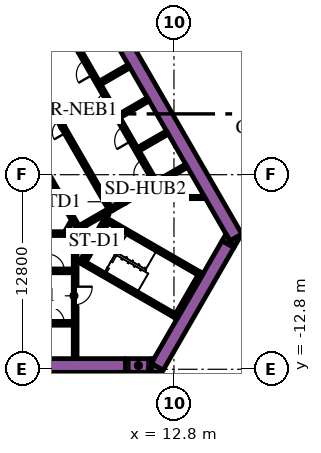
"""IFC4 building model, lengths in metres.
Left out: names, types, materials, properties, quantities, classifications, styles, units other than length and angle.
Written with IfcOpenShell. Run it as: python <this file> out.ifc"""

import sys

from ifc_helpers import new_model, si_unit, direction, frame, frame_2d, origin, place, context, subcontext, project, spatial, polyline, rectangle, outline, extrude, element, fill, save


model = new_model("IFC4")
c1 = context("Model", 3, precision=1e-05, world=origin(), true_north=direction((0.0, 1.0)))
c2 = subcontext(c1, "Body", "Model", "MODEL_VIEW")
j1 = project(units=[si_unit("LENGTHUNIT", "METRE"), si_unit("PLANEANGLEUNIT", "RADIAN")], contexts=[c1])
p1 = place(None, origin())
s1 = spatial("IfcSite", under=j1, at=p1, CompositionType="ELEMENT")
p2 = place(p1, origin())
s2 = spatial("IfcBuilding", under=s1, at=p2, CompositionType="ELEMENT")
p3 = place(p2, frame((0.0, 0.0, 21.6)))
s3 = spatial("IfcBuildingStorey", under=s2, at=p3, CompositionType="ELEMENT", Elevation=21.6)
p4 = place(p3, frame((6.776, 13.364, 0.0), z_axis=(0.0, 0.0, 1.0), x_axis=(0.500004177138, -0.8660229921, 0.0)))
e1 = element("IfcWall", 1, at=p4, inside=s3, PredefinedType="SOLIDWALL", context=c2, shape_type="SweptSolid", body=[
    extrude(rectangle(XDim=20.204, YDim=0.9, at=frame_2d((10.102, 0.0))), origin(), (0.0, 0.0, 1.0), 6.0),
])
p5 = place(p3, origin())
e2 = element("IfcWall", 2, at=p5, inside=s3, PredefinedType="SOLIDWALL", context=c2, shape_type="SweptSolid", body=[
    extrude(outline(polyline([(16.743, -4.8), (16.489, -4.36), (17.251, -3.92), (16.743, -4.8)])), origin(), (0.0, 0.0, 1.0), 6.0),
])
p6 = place(p3, frame((11.695, -12.644, 0.0), z_axis=(0.0, 0.0, 1.0), x_axis=(0.500010229568, 0.86601949766, 0.0)))
e3 = element("IfcWall", 3, at=p6, inside=s3, PredefinedType="SOLIDWALL", context=c2, shape_type="SweptSolid", body=[
    extrude(rectangle(XDim=9.326, YDim=0.9, at=frame_2d((4.663, 0.0))), origin(), (0.0, 0.0, 1.0), 6.0),
])
e4 = element("IfcWall", 4, at=p5, inside=s3, PredefinedType="SOLIDWALL", context=c2, shape_type="SweptSolid", body=[
    extrude(outline(polyline([(12.009, -13.0), (11.312, -13.0), (11.312, -12.425), (12.083, -12.871), (12.009, -13.0)])), origin(), (0.0, 0.0, 1.0), 6.0),
])
e5 = element("IfcWall", 5, at=p5, inside=s3, PredefinedType="SOLIDWALL", context=c2, shape_type="SweptSolid", body=[
    extrude(outline(polyline([(16.223, -3.9), (16.732, -4.78), (15.969, -4.34), (16.223, -3.9)])), origin(), (0.0, 0.0, 1.0), 6.0),
])
e6 = element("IfcWall", 6, at=p5, inside=s3, PredefinedType="SOLIDWALL", context=c2, shape_type="SweptSolid", body=[
    extrude(outline(polyline([(11.489, -12.1), (11.312, -12.407), (11.312, -12.1), (11.489, -12.1)])), origin(), (0.0, 0.0, 1.0), 6.0),
])
p7 = place(p3, frame((-12.019, -12.55, 0.0), z_axis=(0.0, 0.0, 1.0), x_axis=(1.0, 0.0, 0.0)))
e7 = element("IfcWall", 7, at=p7, inside=s3, PredefinedType="SOLIDWALL", context=c2, shape_type="SweptSolid", body=[
    extrude(rectangle(XDim=21.63, YDim=0.9, at=frame_2d((10.815, 0.0))), origin(), (0.0, 0.0, 1.0), 6.0),
])
p8 = place(p3, frame((12.885, -9.431, 0.0), z_axis=(0.0, 0.0, 1.0), x_axis=(0.500020560727, 0.866013532718, 0.0)))
e8 = element("IfcWall", 8, at=p8, inside=s3, PredefinedType="SOLIDWALL", context=c2, shape_type="SweptSolid", body=[
    extrude(rectangle(XDim=3.45, YDim=0.25, at=frame_2d((1.725, 0.0))), origin(), (0.0, 0.0, 1.0), 6.0),
])
p9 = place(p3, frame((12.84, -9.261, 0.0), z_axis=(0.0, 0.0, 1.0), x_axis=(-0.866013990052, 0.500019768644, 0.0)))
e9 = element("IfcWall", 9, at=p9, inside=s3, PredefinedType="SOLIDWALL", context=c2, shape_type="SweptSolid", body=[
    extrude(rectangle(XDim=6.8, YDim=0.25, at=frame_2d((3.4, 0.0))), origin(), (0.0, 0.0, 1.0), 6.0),
])
p10 = place(p3, frame((6.78, -5.906, 0.0), z_axis=(0.0, 0.0, 1.0), x_axis=(0.500223362819, 0.865896406789, 0.0)))
e10 = element("IfcWall", 10, at=p10, inside=s3, PredefinedType="SOLIDWALL", context=c2, shape_type="SweptSolid", body=[
    extrude(rectangle(XDim=0.675, YDim=0.25, at=frame_2d((0.337, 0.0))), origin(), (0.0, 0.0, 1.0), 6.0),
])
p11 = place(p3, frame((8.334, -2.964, 0.0), z_axis=(0.0, 0.0, 1.0), x_axis=(0.866016039709, -0.500016218704, 0.0)))
e11 = element("IfcWall", 11, at=p11, inside=s3, PredefinedType="SOLIDWALL", context=c2, shape_type="SweptSolid", body=[
    extrude(rectangle(XDim=7.05, YDim=0.25, at=frame_2d((3.525, 0.0))), origin(), (0.0, 0.0, 1.0), 6.0),
])
p12 = place(p3, frame((8.168, -3.503, 0.0), z_axis=(0.0, 0.0, 1.0), x_axis=(0.49972245349, 0.866185586049, 0.0)))
e12 = element("IfcWall", 12, at=p12, inside=s3, PredefinedType="SOLIDWALL", context=c2, shape_type="SweptSolid", body=[
    extrude(rectangle(XDim=0.425, YDim=0.25, at=frame_2d((0.212, 0.0))), origin(), (0.0, 0.0, 1.0), 6.0),
])
p13 = place(p3, frame((-5.545, -3.875, 0.0), z_axis=(0.0, 0.0, 1.0), x_axis=(1.0, 0.0, 0.0)))
e13 = element("IfcWall", 13, at=p13, inside=s3, PredefinedType="SOLIDWALL", context=c2, shape_type="SweptSolid", body=[
    extrude(rectangle(XDim=11.97, YDim=0.25, at=frame_2d((5.985, 0.0))), origin(), (0.0, 0.0, 1.0), 6.0),
])
p14 = place(p3, frame((6.3, -8.67, 0.0), z_axis=(0.0, 0.0, 1.0), x_axis=(0.0, -1.0, 0.0)))
e14 = element("IfcWall", 14, at=p14, inside=s3, PredefinedType="SOLIDWALL", context=c2, shape_type="SweptSolid", body=[
    extrude(rectangle(XDim=3.43, YDim=0.25, at=frame_2d((1.715, 0.0))), origin(), (0.0, 0.0, 1.0), 6.0),
])
p15 = place(p3, frame((6.3, -7.268, 0.0), z_axis=(0.0, 0.0, 1.0), x_axis=(0.0, 1.0, 0.0)))
e15 = element("IfcWall", 15, at=p15, inside=s3, PredefinedType="SOLIDWALL", context=c2, shape_type="SweptSolid", body=[
    extrude(rectangle(XDim=3.268, YDim=0.25, at=frame_2d((1.634, 0.0))), origin(), (0.0, 0.0, 1.0), 6.0),
])
p16 = place(p3, frame((10.464, 1.677, 0.0), z_axis=(0.0, 0.0, 1.0), x_axis=(0.86605622881, 0.499946605688, 0.0)))
e16 = element("IfcWall", 16, at=p16, inside=s3, PredefinedType="SOLIDWALL", context=c2, shape_type="SweptSolid", body=[
    extrude(rectangle(XDim=2.2, YDim=0.25, at=frame_2d((1.1, 0.0))), origin(), (0.0, 0.0, 1.0), 6.0),
])
p17 = place(p3, frame((13.629, 0.594, 0.0), z_axis=(0.0, 0.0, 1.0), x_axis=(-0.866063384774, -0.499934209226, 0.0)))
e17 = element("IfcWall", 17, at=p17, inside=s3, PredefinedType="SOLIDWALL", context=c2, shape_type="SweptSolid", body=[
    extrude(rectangle(XDim=2.428, YDim=0.25, at=frame_2d((1.214, 0.0))), origin(), (0.0, 0.0, 1.0), 6.0),
])
e18 = element("IfcWall", 18, at=p5, inside=s3, PredefinedType="SOLIDWALL", context=c2, shape_type="SweptSolid", body=[
    extrude(outline(polyline([(0.566, 6.725), (0.566, 6.875), (0.566, 6.875), (0.565, 6.875), (0.361, 6.875), (0.035, 7.439), (0.252, 7.564), (0.377, 7.348), (6.552, -3.348), (6.677, -3.564), (6.46, -3.689), (0.448, 6.725), (0.565, 6.725), (0.566, 6.725), (0.566, 6.725)])), origin(), (0.0, 0.0, 1.0), 6.0),
])
p18 = place(p3, frame((6.614, -3.456, 0.0), z_axis=(0.0, 0.0, 1.0), x_axis=(0.866031582473, 0.499989298045, 0.0)))
e19 = element("IfcWall", 19, at=p18, inside=s3, PredefinedType="SOLIDWALL", context=c2, shape_type="SweptSolid", body=[
    extrude(rectangle(XDim=2.455, YDim=0.25, at=frame_2d((1.228, 0.0))), origin(), (0.0, 0.0, 1.0), 6.0),
])
for number, where, z_axis, x_axis in (
    (20, (7.944, 6.041, 0.0), (0.0, 0.0, 1.0), (0.866, 0.5, 0.0)),
    (21, (9.204, 3.859, 0.0), (0.0, 0.0, 1.0), (0.866, 0.5, 0.0)),
):
    element("IfcWall", number, at=place(p3, frame(where, z_axis=z_axis, x_axis=x_axis)), inside=s3, PredefinedType="SOLIDWALL", context=c2, shape_type="SweptSolid", body=[
        extrude(rectangle(XDim=2.2, YDim=0.25, at=frame_2d((1.1, 0.0))), origin(), (0.0, 0.0, 1.0), 6.0),
    ])
p19 = place(p3, frame((6.945, -5.222, 0.0), z_axis=(0.0, 0.0, 1.0), x_axis=(-0.499818422106, -0.866130212453, 0.0)))
e22 = element("IfcWall", 22, at=p19, inside=s3, PredefinedType="PARTITIONING", context=c2, shape_type="SweptSolid", body=[
    extrude(rectangle(XDim=0.514, YDim=0.15, at=frame_2d((0.257, 0.0))), origin(), (0.0, 0.0, 1.0), 4.85),
])
p20 = place(p3, frame((5.705, -3.718, 0.0), z_axis=(0.0, 0.0, 1.0), x_axis=(0.499962090823, 0.866047289552, 0.0)))
e23 = element("IfcWall", 23, at=p20, inside=s3, PredefinedType="PARTITIONING", context=c2, shape_type="SweptSolid", body=[
    extrude(rectangle(XDim=0.735, YDim=0.15, at=frame_2d((0.367, 0.0))), origin(), (0.0, 0.0, 1.0), 4.85),
])
p21 = place(p3, frame((8.459, -2.599, 0.0), z_axis=(0.0, 0.0, 1.0), x_axis=(-0.500041054325, -0.866001699761, 0.0)))
e24 = element("IfcWall", 24, at=p21, inside=s3, PredefinedType="PARTITIONING", context=c2, shape_type="SweptSolid", body=[
    extrude(rectangle(XDim=0.929, YDim=0.15, at=frame_2d((0.464, 0.0))), origin(), (0.0, 0.0, 1.0), 6.0),
])
p22 = place(p3, frame((10.362, -1.5, 0.0), z_axis=(0.0, 0.0, 1.0), x_axis=(1.0, 0.0, 0.0)))
e25 = element("IfcWall", 25, at=p22, inside=s3, PredefinedType="PARTITIONING", context=c2, shape_type="SweptSolid", body=[
    extrude(rectangle(XDim=4.439, YDim=0.15, at=frame_2d((2.22, 0.0))), origin(), (0.0, 0.0, 1.0), 4.85),
])
p23 = place(p3, frame((-4.2, -1.5, 0.0), z_axis=(0.0, 0.0, 1.0), x_axis=(1.0, 0.0, 0.0)))
e26 = element("IfcWall", 26, at=p23, inside=s3, PredefinedType="PARTITIONING", context=c2, shape_type="SweptSolid", body=[
    extrude(rectangle(XDim=9.359, YDim=0.15, at=frame_2d((4.68, 0.0))), origin(), (0.0, 0.0, 1.0), 4.85),
])
p24 = place(p3, frame((-6.175, -9.775, 0.0), z_axis=(0.0, 0.0, 1.0), x_axis=(1.0, 0.0, 0.0)))
e27 = element("IfcWall", 27, at=p24, inside=s3, PredefinedType="SOLIDWALL", context=c2, shape_type="SweptSolid", body=[
    extrude(rectangle(XDim=12.35, YDim=0.25, at=frame_2d((6.175, 0.0))), origin(), (0.0, 0.0, 1.0), 6.0),
])
p25 = place(p24, frame((0.585, 0.0, 0.0)))
e28 = element("IfcOpeningElement", 28, at=p25, cuts=e27, PredefinedType="OPENING", context=c2, shape_type="SweptSolid", body=[
    extrude(rectangle(XDim=1.1, YDim=2.1, at=frame_2d((0.55, 1.05))), frame((0.0, 0.135, 0.0), z_axis=(0.0, -1.0, 0.0), x_axis=(1.0, 0.0, 0.0)), (0.0, 0.0, 1.0), 0.27),
])
p26 = place(p24, frame((3.105, 0.0, 0.0)))
e29 = element("IfcOpeningElement", 29, at=p26, cuts=e27, PredefinedType="OPENING", context=c2, shape_type="SweptSolid", body=[
    extrude(rectangle(XDim=1.1, YDim=2.1, at=frame_2d((0.55, 1.05))), frame((0.0, 0.135, 0.0), z_axis=(0.0, -1.0, 0.0), x_axis=(1.0, 0.0, 0.0)), (0.0, 0.0, 1.0), 0.27),
])
p27 = place(p24, frame((5.625, 0.0, 0.0)))
e30 = element("IfcOpeningElement", 30, at=p27, cuts=e27, PredefinedType="OPENING", context=c2, shape_type="SweptSolid", body=[
    extrude(rectangle(XDim=1.1, YDim=2.1, at=frame_2d((0.55, 1.05))), frame((0.0, 0.135, 0.0), z_axis=(0.0, -1.0, 0.0), x_axis=(1.0, 0.0, 0.0)), (0.0, 0.0, 1.0), 0.27),
])
p28 = place(p24, frame((8.145, 0.0, 0.0)))
e31 = element("IfcOpeningElement", 31, at=p28, cuts=e27, PredefinedType="OPENING", context=c2, shape_type="SweptSolid", body=[
    extrude(rectangle(XDim=1.1, YDim=2.1, at=frame_2d((0.55, 1.05))), frame((0.0, 0.135, 0.0), z_axis=(0.0, -1.0, 0.0), x_axis=(1.0, 0.0, 0.0)), (0.0, 0.0, 1.0), 0.27),
])
p29 = place(p24, frame((10.665, 0.0, 0.0)))
e32 = element("IfcOpeningElement", 32, at=p29, cuts=e27, PredefinedType="OPENING", context=c2, shape_type="SweptSolid", body=[
    extrude(rectangle(XDim=1.1, YDim=2.1, at=frame_2d((0.55, 1.05))), frame((0.0, 0.135, 0.0), z_axis=(0.0, -1.0, 0.0), x_axis=(1.0, 0.0, 0.0)), (0.0, 0.0, 1.0), 0.27),
])
p30 = place(p3, frame((-6.175, -6.325, 0.0), z_axis=(0.0, 0.0, 1.0), x_axis=(1.0, 0.0, 0.0)))
e33 = element("IfcWall", 33, at=p30, inside=s3, PredefinedType="SOLIDWALL", context=c2, shape_type="SweptSolid", body=[
    extrude(rectangle(XDim=12.35, YDim=0.25, at=frame_2d((6.175, 0.0))), origin(), (0.0, 0.0, 1.0), 6.0),
])
p31 = place(p30, frame((3.205, 0.0, 0.0)))
e34 = element("IfcOpeningElement", 34, at=p31, cuts=e33, PredefinedType="OPENING", context=c2, shape_type="SweptSolid", body=[
    extrude(rectangle(XDim=0.9, YDim=2.1, at=frame_2d((0.45, 1.05))), frame((0.0, 0.135, 0.0), z_axis=(0.0, -1.0, 0.0), x_axis=(1.0, 0.0, 0.0)), (0.0, 0.0, 1.0), 0.27),
])
p32 = place(p30, frame((8.145, 0.0, 0.0)))
e35 = element("IfcOpeningElement", 35, at=p32, cuts=e33, PredefinedType="OPENING", context=c2, shape_type="SweptSolid", body=[
    extrude(rectangle(XDim=1.1, YDim=2.1, at=frame_2d((0.55, 1.05))), frame((0.0, 0.135, 0.0), z_axis=(0.0, -1.0, 0.0), x_axis=(1.0, 0.0, 0.0)), (0.0, 0.0, 1.0), 0.27),
])
p33 = place(p30, frame((10.665, 0.0, 0.0)))
e36 = element("IfcOpeningElement", 36, at=p33, cuts=e33, PredefinedType="OPENING", context=c2, shape_type="SweptSolid", body=[
    extrude(rectangle(XDim=1.1, YDim=2.1, at=frame_2d((0.55, 1.05))), frame((0.0, 0.135, 0.0), z_axis=(0.0, -1.0, 0.0), x_axis=(1.0, 0.0, 0.0)), (0.0, 0.0, 1.0), 0.27),
])
p34 = place(p3, frame((11.553, -0.46, 0.0), z_axis=(0.0, 0.0, 1.0), x_axis=(-0.500006514828, 0.866021642414, 0.0)))
e37 = element("IfcWall", 37, at=p34, inside=s3, PredefinedType="SOLIDWALL", context=c2, shape_type="SweptSolid", body=[
    extrude(rectangle(XDim=12.35, YDim=0.25, at=frame_2d((6.175, 0.0))), origin(), (0.0, 0.0, 1.0), 6.0),
])
p35 = place(p34, frame((0.585, 0.0, 0.0)))
e38 = element("IfcOpeningElement", 38, at=p35, cuts=e37, PredefinedType="OPENING", context=c2, shape_type="SweptSolid", body=[
    extrude(rectangle(XDim=1.1, YDim=2.1, at=frame_2d((0.55, 1.05))), frame((0.0, 0.135, 0.0), z_axis=(0.0, -1.0, 0.0), x_axis=(1.0, 0.0, 0.0)), (0.0, 0.0, 1.0), 0.27),
])
p36 = place(p34, frame((3.105, 0.0, 0.0)))
e39 = element("IfcOpeningElement", 39, at=p36, cuts=e37, PredefinedType="OPENING", context=c2, shape_type="SweptSolid", body=[
    extrude(rectangle(XDim=1.1, YDim=2.1, at=frame_2d((0.55, 1.05))), frame((0.0, 0.135, 0.0), z_axis=(0.0, -1.0, 0.0), x_axis=(1.0, 0.0, 0.0)), (0.0, 0.0, 1.0), 0.27),
])
p37 = place(p34, frame((5.625, 0.0, 0.0)))
e40 = element("IfcOpeningElement", 40, at=p37, cuts=e37, PredefinedType="OPENING", context=c2, shape_type="SweptSolid", body=[
    extrude(rectangle(XDim=1.1, YDim=2.1, at=frame_2d((0.55, 1.05))), frame((0.0, 0.135, 0.0), z_axis=(0.0, -1.0, 0.0), x_axis=(1.0, 0.0, 0.0)), (0.0, 0.0, 1.0), 0.27),
])
p38 = place(p34, frame((8.145, 0.0, 0.0)))
e41 = element("IfcOpeningElement", 41, at=p38, cuts=e37, PredefinedType="OPENING", context=c2, shape_type="SweptSolid", body=[
    extrude(rectangle(XDim=1.1, YDim=2.1, at=frame_2d((0.55, 1.05))), frame((0.0, 0.135, 0.0), z_axis=(0.0, -1.0, 0.0), x_axis=(1.0, 0.0, 0.0)), (0.0, 0.0, 1.0), 0.27),
])
p39 = place(p34, frame((10.665, 0.0, 0.0)))
e42 = element("IfcOpeningElement", 42, at=p39, cuts=e37, PredefinedType="OPENING", context=c2, shape_type="SweptSolid", body=[
    extrude(rectangle(XDim=1.1, YDim=2.1, at=frame_2d((0.55, 1.05))), frame((0.0, 0.135, 0.0), z_axis=(0.0, -1.0, 0.0), x_axis=(1.0, 0.0, 0.0)), (0.0, 0.0, 1.0), 0.27),
])
p40 = place(p3, frame((8.565, -2.185, 0.0), z_axis=(0.0, 0.0, 1.0), x_axis=(-0.499997954832, 0.866026584559, 0.0)))
e43 = element("IfcWall", 43, at=p40, inside=s3, PredefinedType="SOLIDWALL", context=c2, shape_type="SweptSolid", body=[
    extrude(rectangle(XDim=12.35, YDim=0.25, at=frame_2d((6.175, 0.0))), origin(), (0.0, 0.0, 1.0), 6.0),
])
p41 = place(p40, frame((5.725, 0.0, 0.0)))
e44 = element("IfcOpeningElement", 44, at=p41, cuts=e43, PredefinedType="OPENING", context=c2, shape_type="SweptSolid", body=[
    extrude(rectangle(XDim=0.9, YDim=2.1, at=frame_2d((0.45, 1.05))), frame((0.0, 0.135, 0.0), z_axis=(0.0, -1.0, 0.0), x_axis=(1.0, 0.0, 0.0)), (0.0, 0.0, 1.0), 0.27),
])
p42 = place(p3, frame((7.053, -5.284, 0.0), z_axis=(0.0, 0.0, 1.0), x_axis=(0.500078061341, 0.865980330357, 0.0)))
e45 = element("IfcWall", 45, at=p42, inside=s3, PredefinedType="SOLIDWALL", context=c2, shape_type="SweptSolid", body=[
    extrude(rectangle(XDim=2.1, YDim=0.4, at=frame_2d((1.05, 0.0))), origin(), (0.0, 0.0, 1.0), 6.0),
])
p43 = place(p42, frame((0.45, 0.0, 0.0)))
e46 = element("IfcOpeningElement", 46, at=p43, cuts=e45, PredefinedType="OPENING", context=c2, shape_type="SweptSolid", body=[
    extrude(rectangle(XDim=1.2, YDim=2.1, at=frame_2d((0.6, 1.05))), frame((0.0, 0.21, 0.0), z_axis=(0.0, -1.0, 0.0), x_axis=(1.0, 0.0, 0.0)), (0.0, 0.0, 1.0), 0.42),
])
p44 = place(p3, frame((8.74, -2.229, 0.0), z_axis=(0.0, 0.0, 1.0), x_axis=(0.865989075817, 0.500062916607, 0.0)))
e47 = element("IfcWall", 47, at=p44, inside=s3, PredefinedType="SOLIDWALL", context=c2, shape_type="SweptSolid", body=[
    extrude(rectangle(XDim=1.8, YDim=0.25, at=frame_2d((0.9, 0.0))), origin(), (0.0, 0.0, 1.0), 6.0),
])
p45 = place(p44, frame((0.45, 0.0, 0.0)))
e48 = element("IfcOpeningElement", 48, at=p45, cuts=e47, PredefinedType="OPENING", context=c2, shape_type="SweptSolid", body=[
    extrude(rectangle(XDim=0.9, YDim=2.1, at=frame_2d((0.45, 1.05))), frame((0.0, 0.135, 0.0), z_axis=(0.0, -1.0, 0.0), x_axis=(1.0, 0.0, 0.0)), (0.0, 0.0, 1.0), 0.27),
])
p46 = place(p3, frame((6.22, -7.266, 0.0), z_axis=(0.0, 0.0, 1.0), x_axis=(0.0, -1.0, 0.0)))
e49 = element("IfcWall", 49, at=p46, inside=s3, PredefinedType="PARTITIONING", context=c2, shape_type="SweptSolid", body=[
    extrude(rectangle(XDim=1.4, YDim=0.09, at=frame_2d((0.7, 0.0))), origin(), (0.0, 0.0, 1.0), 4.85),
])
p47 = place(p46, frame((0.1, 0.0, 0.0)))
e50 = element("IfcOpeningElement", 50, at=p47, cuts=e49, PredefinedType="OPENING", context=c2, shape_type="SweptSolid", body=[
    extrude(rectangle(XDim=1.2, YDim=2.1, at=frame_2d((0.6, 1.05))), frame((0.0, 0.055, 0.0), z_axis=(0.0, -1.0, 0.0), x_axis=(1.0, 0.0, 0.0)), (0.0, 0.0, 1.0), 0.11),
])
p48 = place(p3, frame((11.312, -12.55, 0.0), z_axis=(0.0, 0.0, 1.0), x_axis=(-1.0, 0.0, 0.0)))
e51 = element("IfcWall", 51, at=p48, inside=s3, PredefinedType="SOLIDWALL", context=c2, shape_type="SweptSolid", body=[
    extrude(rectangle(XDim=1.7, YDim=0.9, at=frame_2d((0.85, 0.0))), origin(), (0.0, 0.0, 1.0), 6.0),
])
p49 = place(p48, frame((0.25, 0.0, 0.0)))
e52 = element("IfcOpeningElement", 52, at=p49, cuts=e51, PredefinedType="OPENING", context=c2, shape_type="SweptSolid", body=[
    extrude(rectangle(XDim=1.2, YDim=2.1, at=frame_2d((0.6, 1.05))), frame((0.0, 0.46, 0.0), z_axis=(0.0, -1.0, 0.0), x_axis=(1.0, 0.0, 0.0)), (0.0, 0.0, 1.0), 0.92),
])
p50 = place(p3, frame((10.313, -1.32, 0.0), z_axis=(0.0, 0.0, 1.0), x_axis=(0.866034573852, 0.49998411664, 0.0)))
e53 = element("IfcWall", 53, at=p50, inside=s3, PredefinedType="SOLIDWALL", context=c2, shape_type="SweptSolid", body=[
    extrude(rectangle(XDim=1.4, YDim=0.25, at=frame_2d((0.7, 0.0))), origin(), (0.0, 0.0, 1.0), 6.0),
])
p51 = place(p50, frame((0.25, 0.0, 0.0)))
e54 = element("IfcOpeningElement", 54, at=p51, cuts=e53, PredefinedType="OPENING", context=c2, shape_type="SweptSolid", body=[
    extrude(rectangle(XDim=0.9, YDim=2.1, at=frame_2d((0.45, 1.05))), frame((0.0, 0.135, 0.0), z_axis=(0.0, -1.0, 0.0), x_axis=(1.0, 0.0, 0.0)), (0.0, 0.0, 1.0), 0.27),
])
p52 = place(p3, frame((38.25, -14.145, 0.0), z_axis=(0.0, 0.0, 1.0), x_axis=(-0.500000527961, 0.866025098966, 0.0)))
e55 = element("IfcWall", 55, at=p52, inside=s3, PredefinedType="SOLIDWALL", context=c2, shape_type="SweptSolid", body=[
    extrude(rectangle(XDim=62.75, YDim=0.25, at=frame_2d((31.375, 0.0))), origin(), (0.0, 0.0, 1.0), 4.5),
])
p53 = place(p29, origin())
e56 = element("IfcDoor", 56, at=p53, inside=s3, OperationType="DOUBLE_DOOR_SLIDING", PredefinedType="DOOR", context=c2, shape_type="SweptSolid", body=[
    extrude(rectangle(XDim=1.1, YDim=2.1, at=frame_2d((0.55, 1.05))), frame((0.0, 0.025, 0.0), z_axis=(0.0, -1.0, 0.0), x_axis=(1.0, 0.0, 0.0)), (0.0, 0.0, 1.0), 0.05),
])
fill(e32, e56)
p54 = place(p33, origin())
e57 = element("IfcDoor", 57, at=p54, inside=s3, OperationType="DOUBLE_DOOR_SLIDING", PredefinedType="DOOR", context=c2, shape_type="SweptSolid", body=[
    extrude(rectangle(XDim=1.1, YDim=2.1, at=frame_2d((0.55, 1.05))), frame((0.0, 0.025, 0.0), z_axis=(0.0, -1.0, 0.0), x_axis=(1.0, 0.0, 0.0)), (0.0, 0.0, 1.0), 0.05),
])
fill(e36, e57)
p55 = place(p35, origin())
e58 = element("IfcDoor", 58, at=p55, inside=s3, OperationType="DOUBLE_DOOR_SLIDING", PredefinedType="DOOR", context=c2, shape_type="SweptSolid", body=[
    extrude(rectangle(XDim=1.1, YDim=2.1, at=frame_2d((0.55, 1.05))), frame((0.0, 0.025, 0.0), z_axis=(0.0, -1.0, 0.0), x_axis=(1.0, 0.0, 0.0)), (0.0, 0.0, 1.0), 0.05),
])
fill(e38, e58)
p56 = place(p36, origin())
e59 = element("IfcDoor", 59, at=p56, inside=s3, OperationType="DOUBLE_DOOR_SLIDING", PredefinedType="DOOR", context=c2, shape_type="SweptSolid", body=[
    extrude(rectangle(XDim=1.1, YDim=2.1, at=frame_2d((0.55, 1.05))), frame((0.0, 0.025, 0.0), z_axis=(0.0, -1.0, 0.0), x_axis=(1.0, 0.0, 0.0)), (0.0, 0.0, 1.0), 0.05),
])
fill(e39, e59)
p57 = place(p37, origin())
e60 = element("IfcDoor", 60, at=p57, inside=s3, OperationType="DOUBLE_DOOR_SLIDING", PredefinedType="DOOR", context=c2, shape_type="SweptSolid", body=[
    extrude(rectangle(XDim=1.1, YDim=2.1, at=frame_2d((0.55, 1.05))), frame((0.0, 0.025, 0.0), z_axis=(0.0, -1.0, 0.0), x_axis=(1.0, 0.0, 0.0)), (0.0, 0.0, 1.0), 0.05),
])
fill(e40, e60)
p58 = place(p38, origin())
e61 = element("IfcDoor", 61, at=p58, inside=s3, OperationType="DOUBLE_DOOR_SLIDING", PredefinedType="DOOR", context=c2, shape_type="SweptSolid", body=[
    extrude(rectangle(XDim=1.1, YDim=2.1, at=frame_2d((0.55, 1.05))), frame((0.0, 0.025, 0.0), z_axis=(0.0, -1.0, 0.0), x_axis=(1.0, 0.0, 0.0)), (0.0, 0.0, 1.0), 0.05),
])
fill(e41, e61)
p59 = place(p41, origin())
e62 = element("IfcDoor", 62, at=p59, inside=s3, OperationType="SINGLE_SWING_LEFT", PredefinedType="DOOR", context=c2, shape_type="SweptSolid", body=[
    extrude(rectangle(XDim=0.9, YDim=2.1, at=frame_2d((0.45, 1.05))), frame((0.0, 0.025, 0.0), z_axis=(0.0, -1.0, 0.0), x_axis=(1.0, 0.0, 0.0)), (0.0, 0.0, 1.0), 0.05),
])
fill(e44, e62)
p60 = place(p43, origin())
e63 = element("IfcDoor", 63, at=p60, inside=s3, OperationType="SINGLE_SWING_LEFT", PredefinedType="DOOR", context=c2, shape_type="SweptSolid", body=[
    extrude(rectangle(XDim=1.2, YDim=2.1, at=frame_2d((0.6, 1.05))), frame((0.0, 0.025, 0.0), z_axis=(0.0, -1.0, 0.0), x_axis=(1.0, 0.0, 0.0)), (0.0, 0.0, 1.0), 0.05),
])
fill(e46, e63)
p61 = place(p45, origin())
e64 = element("IfcDoor", 64, at=p61, inside=s3, OperationType="SINGLE_SWING_LEFT", PredefinedType="DOOR", context=c2, shape_type="SweptSolid", body=[
    extrude(rectangle(XDim=0.9, YDim=2.1, at=frame_2d((0.45, 1.05))), frame((0.0, 0.025, 0.0), z_axis=(0.0, -1.0, 0.0), x_axis=(1.0, 0.0, 0.0)), (0.0, 0.0, 1.0), 0.05),
])
fill(e48, e64)
p62 = place(p47, origin())
e65 = element("IfcDoor", 65, at=p62, inside=s3, OperationType="SINGLE_SWING_LEFT", PredefinedType="DOOR", context=c2, shape_type="SweptSolid", body=[
    extrude(rectangle(XDim=1.2, YDim=2.1, at=frame_2d((0.6, 1.05))), frame((0.0, 0.025, 0.0), z_axis=(0.0, -1.0, 0.0), x_axis=(1.0, 0.0, 0.0)), (0.0, 0.0, 1.0), 0.05),
])
fill(e50, e65)
p63 = place(p49, origin())
e66 = element("IfcDoor", 66, at=p63, inside=s3, OperationType="SINGLE_SWING_LEFT", PredefinedType="DOOR", context=c2, shape_type="SweptSolid", body=[
    extrude(rectangle(XDim=1.2, YDim=2.1, at=frame_2d((0.6, 1.05))), frame((0.0, 0.025, 0.0), z_axis=(0.0, -1.0, 0.0), x_axis=(1.0, 0.0, 0.0)), (0.0, 0.0, 1.0), 0.05),
])
fill(e52, e66)
p64 = place(p51, origin())
e67 = element("IfcDoor", 67, at=p64, inside=s3, OperationType="SINGLE_SWING_LEFT", PredefinedType="DOOR", context=c2, shape_type="SweptSolid", body=[
    extrude(rectangle(XDim=0.9, YDim=2.1, at=frame_2d((0.45, 1.05))), frame((0.0, 0.025, 0.0), z_axis=(0.0, -1.0, 0.0), x_axis=(1.0, 0.0, 0.0)), (0.0, 0.0, 1.0), 0.05),
])
fill(e54, e67)
save(model, sys.argv[1])
